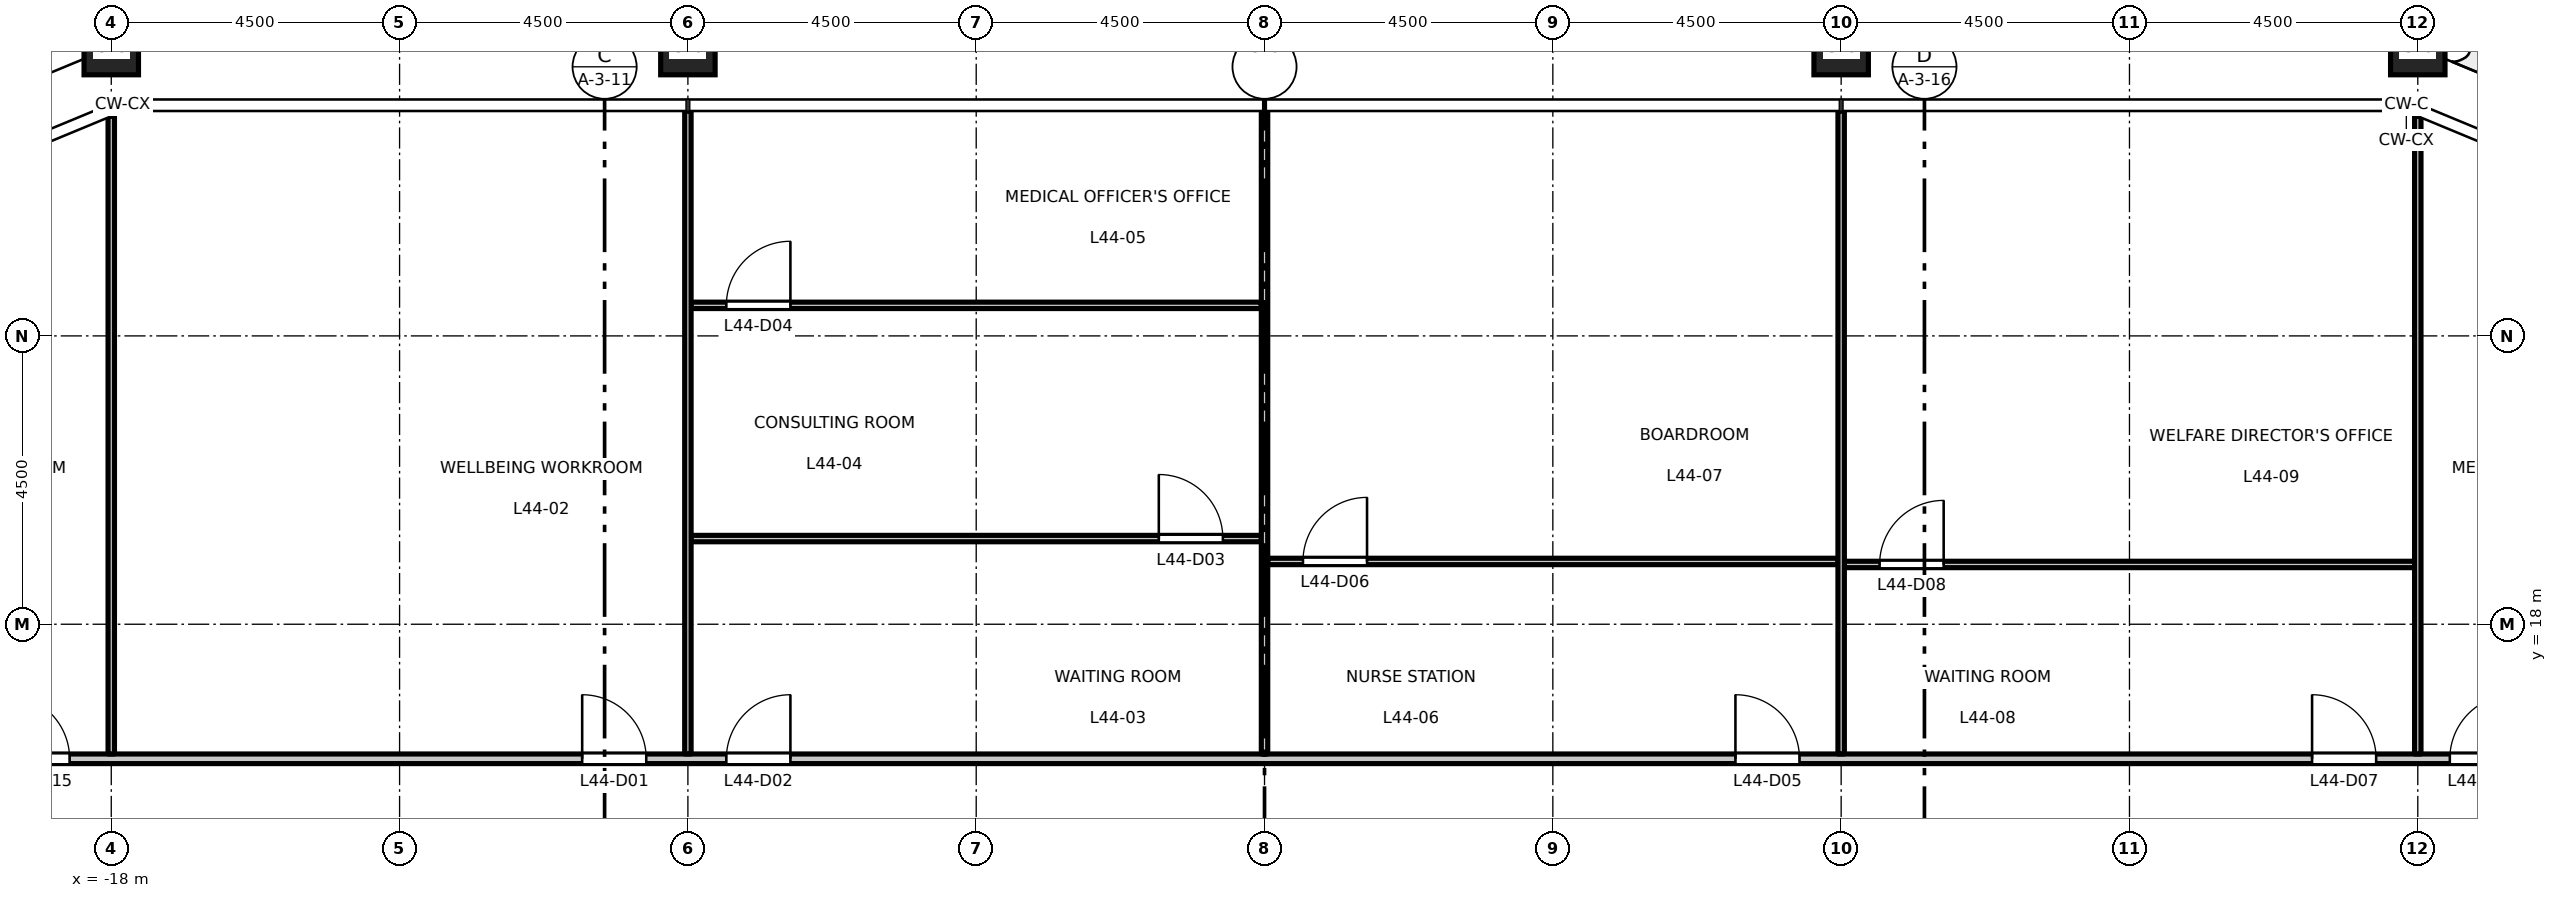
"""IFC4 building model, lengths in metres.
Left out: names, types, materials, properties, quantities, classifications, styles, units other than length and angle.
Written with IfcOpenShell. Run it as: python <this file> out.ifc"""

import sys

from ifc_helpers import new_model, si_unit, direction, frame, frame_2d, origin, origin_2d, place, context, subcontext, project, spatial, rectangle, hollow_rectangle, extrude, element, fill, save


model = new_model("IFC4")
c1 = context("Model", 3, precision=1e-05, world=origin(), true_north=direction((0.0, 1.0)))
c2 = subcontext(c1, "Body", "Model", "MODEL_VIEW")
j1 = project(units=[si_unit("LENGTHUNIT", "METRE"), si_unit("PLANEANGLEUNIT", "RADIAN")], contexts=[c1])
p1 = place(None, origin())
s1 = spatial("IfcSite", under=j1, at=p1, CompositionType="ELEMENT")
p2 = place(p1, origin())
s2 = spatial("IfcBuilding", under=s1, at=p2, CompositionType="ELEMENT")
p3 = place(p2, frame((0.0, 0.0, 206.2)))
s3 = spatial("IfcBuildingStorey", under=s2, at=p3, CompositionType="ELEMENT", Elevation=206.2)
for number, where, z_axis, x_axis in (
    (1, (18.0, 27.0, 0.0), (0.0, 0.0, 1.0), (1.0, 0.0, 0.0)),
    (2, (9.0, 27.0, 0.0), (0.0, 0.0, 1.0), (1.0, 0.0, 0.0)),
    (3, (0.0, 27.0, 0.0), (0.0, 0.0, 1.0), (1.0, 0.0, 0.0)),
    (4, (-9.0, 27.0, 0.0), (0.0, 0.0, 1.0), (1.0, 0.0, 0.0)),
    (5, (-18.0, 27.0, 0.0), (0.0, 0.0, 1.0), (1.0, 0.0, 0.0)),
):
    element("IfcColumn", number, at=place(p3, frame(where, z_axis=z_axis, x_axis=x_axis)), inside=s3, PredefinedType="COLUMN", context=c2, shape_type="SweptSolid", body=[
        extrude(hollow_rectangle(XDim=0.85, YDim=0.85, WallThickness=0.05, at=origin_2d()), origin(), (0.0, 0.0, 1.0), 4.5),
    ])
p4 = place(p3, frame((-24.225, 15.9, 0.0), z_axis=(0.0, 0.0, 1.0), x_axis=(1.0, 0.0, 0.0)))
e6 = element("IfcWall", 6, at=p4, inside=s3, PredefinedType="PARTITIONING", context=c2, shape_type="SweptSolid", body=[
    extrude(rectangle(XDim=48.45, YDim=0.15, at=frame_2d((24.225, 0.0))), origin(), (0.0, 0.0, 1.0), 4.35),
])
p5 = place(p4, frame((13.575, 0.0, 0.0)))
e7 = element("IfcOpeningElement", 7, at=p5, cuts=e6, PredefinedType="OPENING", context=c2, shape_type="SweptSolid", body=[
    extrude(rectangle(XDim=1.0, YDim=2.1, at=frame_2d((0.5, 1.05))), frame((0.0, 0.085, 0.0), z_axis=(0.0, -1.0, 0.0), x_axis=(1.0, 0.0, 0.0)), (0.0, 0.0, 1.0), 0.17),
])
p6 = place(p4, frame((15.825, 0.0, 0.0)))
e8 = element("IfcOpeningElement", 8, at=p6, cuts=e6, PredefinedType="OPENING", context=c2, shape_type="SweptSolid", body=[
    extrude(rectangle(XDim=1.0, YDim=2.1, at=frame_2d((0.5, 1.05))), frame((0.0, 0.085, 0.0), z_axis=(0.0, -1.0, 0.0), x_axis=(1.0, 0.0, 0.0)), (0.0, 0.0, 1.0), 0.17),
])
p7 = place(p4, frame((31.575, 0.0, 0.0)))
e9 = element("IfcOpeningElement", 9, at=p7, cuts=e6, PredefinedType="OPENING", context=c2, shape_type="SweptSolid", body=[
    extrude(rectangle(XDim=1.0, YDim=2.1, at=frame_2d((0.5, 1.05))), frame((0.0, 0.085, 0.0), z_axis=(0.0, -1.0, 0.0), x_axis=(1.0, 0.0, 0.0)), (0.0, 0.0, 1.0), 0.17),
])
p8 = place(p4, frame((40.575, 0.0, 0.0)))
e10 = element("IfcOpeningElement", 10, at=p8, cuts=e6, PredefinedType="OPENING", context=c2, shape_type="SweptSolid", body=[
    extrude(rectangle(XDim=1.0, YDim=2.1, at=frame_2d((0.5, 1.05))), frame((0.0, 0.085, 0.0), z_axis=(0.0, -1.0, 0.0), x_axis=(1.0, 0.0, 0.0)), (0.0, 0.0, 1.0), 0.17),
])
p9 = place(p4, frame((4.575, 0.0, 0.0)))
e11 = element("IfcOpeningElement", 11, at=p9, cuts=e6, PredefinedType="OPENING", context=c2, shape_type="SweptSolid", body=[
    extrude(rectangle(XDim=1.0, YDim=2.1, at=frame_2d((0.5, 1.05))), frame((0.0, 0.085, 0.0), z_axis=(0.0, -1.0, 0.0), x_axis=(1.0, 0.0, 0.0)), (0.0, 0.0, 1.0), 0.17),
])
p10 = place(p4, frame((42.725, 0.0, 0.0)))
e12 = element("IfcOpeningElement", 12, at=p10, cuts=e6, PredefinedType="OPENING", context=c2, shape_type="SweptSolid", body=[
    extrude(rectangle(XDim=1.0, YDim=2.1, at=frame_2d((0.5, 1.05))), frame((0.0, 0.085, 0.0), z_axis=(0.0, -1.0, 0.0), x_axis=(1.0, 0.0, 0.0)), (0.0, 0.0, 1.0), 0.17),
])
p11 = place(p3, frame((9.05, 18.933, 0.0), z_axis=(0.0, 0.0, 1.0), x_axis=(1.0, 0.0, 0.0)))
e13 = element("IfcWall", 13, at=p11, inside=s3, PredefinedType="PARTITIONING", context=c2, shape_type="SweptSolid", body=[
    extrude(rectangle(XDim=8.9, YDim=0.1, at=frame_2d((4.45, 0.0))), origin(), (0.0, 0.0, 1.0), 4.35),
])
p12 = place(p11, frame((0.55, 0.0, 0.0)))
e14 = element("IfcOpeningElement", 14, at=p12, cuts=e13, PredefinedType="OPENING", context=c2, shape_type="SweptSolid", body=[
    extrude(rectangle(XDim=1.0, YDim=2.1, at=frame_2d((0.5, 1.05))), frame((0.0, 0.06, 0.0), z_axis=(0.0, -1.0, 0.0), x_axis=(1.0, 0.0, 0.0)), (0.0, 0.0, 1.0), 0.12),
])
p13 = place(p3, frame((0.05, 18.98, 0.0), z_axis=(0.0, 0.0, 1.0), x_axis=(1.0, 0.0, 0.0)))
e15 = element("IfcWall", 15, at=p13, inside=s3, PredefinedType="PARTITIONING", context=c2, shape_type="SweptSolid", body=[
    extrude(rectangle(XDim=8.9, YDim=0.1, at=frame_2d((4.45, 0.0))), origin(), (0.0, 0.0, 1.0), 4.35),
])
p14 = place(p13, frame((0.55, 0.0, 0.0)))
e16 = element("IfcOpeningElement", 16, at=p14, cuts=e15, PredefinedType="OPENING", context=c2, shape_type="SweptSolid", body=[
    extrude(rectangle(XDim=1.0, YDim=2.1, at=frame_2d((0.5, 1.05))), frame((0.0, 0.06, 0.0), z_axis=(0.0, -1.0, 0.0), x_axis=(1.0, 0.0, 0.0)), (0.0, 0.0, 1.0), 0.12),
])
p15 = place(p3, frame((-8.95, 19.337, 0.0), z_axis=(0.0, 0.0, 1.0), x_axis=(1.0, 0.0, 0.0)))
e17 = element("IfcWall", 17, at=p15, inside=s3, PredefinedType="PARTITIONING", context=c2, shape_type="SweptSolid", body=[
    extrude(rectangle(XDim=8.9, YDim=0.1, at=frame_2d((4.45, 0.0))), origin(), (0.0, 0.0, 1.0), 4.35),
])
p16 = place(p15, frame((7.3, 0.0, 0.0)))
e18 = element("IfcOpeningElement", 18, at=p16, cuts=e17, PredefinedType="OPENING", context=c2, shape_type="SweptSolid", body=[
    extrude(rectangle(XDim=1.0, YDim=2.1, at=frame_2d((0.5, 1.05))), frame((0.0, 0.06, 0.0), z_axis=(0.0, -1.0, 0.0), x_axis=(1.0, 0.0, 0.0)), (0.0, 0.0, 1.0), 0.12),
])
p17 = place(p3, frame((-8.95, 22.977, 0.0), z_axis=(0.0, 0.0, 1.0), x_axis=(1.0, 0.0, 0.0)))
e19 = element("IfcWall", 19, at=p17, inside=s3, PredefinedType="PARTITIONING", context=c2, shape_type="SweptSolid", body=[
    extrude(rectangle(XDim=8.9, YDim=0.1, at=frame_2d((4.45, 0.0))), origin(), (0.0, 0.0, 1.0), 4.35),
])
p18 = place(p17, frame((0.55, 0.0, 0.0)))
e20 = element("IfcOpeningElement", 20, at=p18, cuts=e19, PredefinedType="OPENING", context=c2, shape_type="SweptSolid", body=[
    extrude(rectangle(XDim=1.0, YDim=2.1, at=frame_2d((0.5, 1.05))), frame((0.0, 0.06, 0.0), z_axis=(0.0, -1.0, 0.0), x_axis=(1.0, 0.0, 0.0)), (0.0, 0.0, 1.0), 0.12),
])
p19 = place(p3, frame((-18.0, 15.975, 0.0), z_axis=(0.0, 0.0, 1.0), x_axis=(0.0, 1.0, 0.0)))
e21 = element("IfcWall", 21, at=p19, inside=s3, PredefinedType="PARTITIONING", context=c2, shape_type="SweptSolid", body=[
    extrude(rectangle(XDim=9.953, YDim=0.1, at=frame_2d((4.977, 0.0))), origin(), (0.0, 0.0, 1.0), 3.65),
])
p20 = place(p3, frame((-9.0, 15.975, 0.0), z_axis=(0.0, 0.0, 1.0), x_axis=(0.0, 1.0, 0.0)))
e22 = element("IfcWall", 22, at=p20, inside=s3, PredefinedType="PARTITIONING", context=c2, shape_type="SweptSolid", body=[
    extrude(rectangle(XDim=10.035, YDim=0.1, at=frame_2d((5.018, 0.0))), origin(), (0.0, 0.0, 1.0), 3.65),
])
p21 = place(p3, frame((0.0, 15.975, 0.0), z_axis=(0.0, 0.0, 1.0), x_axis=(0.0, 1.0, 0.0)))
e23 = element("IfcWall", 23, at=p21, inside=s3, PredefinedType="PARTITIONING", context=c2, shape_type="SweptSolid", body=[
    extrude(rectangle(XDim=10.035, YDim=0.1, at=frame_2d((5.018, 0.0))), origin(), (0.0, 0.0, 1.0), 3.55),
])
p22 = place(p3, frame((9.0, 15.975, 0.0), z_axis=(0.0, 0.0, 1.0), x_axis=(0.0, 1.0, 0.0)))
e24 = element("IfcWall", 24, at=p22, inside=s3, PredefinedType="PARTITIONING", context=c2, shape_type="SweptSolid", body=[
    extrude(rectangle(XDim=10.035, YDim=0.1, at=frame_2d((5.018, 0.0))), origin(), (0.0, 0.0, 1.0), 3.65),
])
p23 = place(p3, frame((18.0, 15.975, 0.0), z_axis=(0.0, 0.0, 1.0), x_axis=(0.0, 1.0, 0.0)))
e25 = element("IfcWall", 25, at=p23, inside=s3, PredefinedType="PARTITIONING", context=c2, shape_type="SweptSolid", body=[
    extrude(rectangle(XDim=9.953, YDim=0.1, at=frame_2d((4.977, 0.0))), origin(), (0.0, 0.0, 1.0), 3.65),
])
p24 = place(p5, origin())
e26 = element("IfcDoor", 26, at=p24, inside=s3, OperationType="SINGLE_SWING_LEFT", PredefinedType="DOOR", context=c2, shape_type="SweptSolid", body=[
    extrude(rectangle(XDim=1.0, YDim=2.1, at=frame_2d((0.5, 1.05))), frame((0.0, 0.025, 0.0), z_axis=(0.0, -1.0, 0.0), x_axis=(1.0, 0.0, 0.0)), (0.0, 0.0, 1.0), 0.05),
])
fill(e7, e26)
p25 = place(p6, origin())
e27 = element("IfcDoor", 27, at=p25, inside=s3, OperationType="SINGLE_SWING_RIGHT", PredefinedType="DOOR", context=c2, shape_type="SweptSolid", body=[
    extrude(rectangle(XDim=1.0, YDim=2.1, at=frame_2d((0.5, 1.05))), frame((0.0, 0.025, 0.0), z_axis=(0.0, -1.0, 0.0), x_axis=(1.0, 0.0, 0.0)), (0.0, 0.0, 1.0), 0.05),
])
fill(e8, e27)
p26 = place(p16, origin())
e28 = element("IfcDoor", 28, at=p26, inside=s3, OperationType="SINGLE_SWING_LEFT", PredefinedType="DOOR", context=c2, shape_type="SweptSolid", body=[
    extrude(rectangle(XDim=1.0, YDim=2.1, at=frame_2d((0.5, 1.05))), frame((0.0, 0.025, 0.0), z_axis=(0.0, -1.0, 0.0), x_axis=(1.0, 0.0, 0.0)), (0.0, 0.0, 1.0), 0.05),
])
fill(e18, e28)
p27 = place(p18, origin())
e29 = element("IfcDoor", 29, at=p27, inside=s3, OperationType="SINGLE_SWING_RIGHT", PredefinedType="DOOR", context=c2, shape_type="SweptSolid", body=[
    extrude(rectangle(XDim=1.0, YDim=2.1, at=frame_2d((0.5, 1.05))), frame((0.0, 0.025, 0.0), z_axis=(0.0, -1.0, 0.0), x_axis=(1.0, 0.0, 0.0)), (0.0, 0.0, 1.0), 0.05),
])
fill(e20, e29)
p28 = place(p7, origin())
e30 = element("IfcDoor", 30, at=p28, inside=s3, OperationType="SINGLE_SWING_LEFT", PredefinedType="DOOR", context=c2, shape_type="SweptSolid", body=[
    extrude(rectangle(XDim=1.0, YDim=2.1, at=frame_2d((0.5, 1.05))), frame((0.0, 0.025, 0.0), z_axis=(0.0, -1.0, 0.0), x_axis=(1.0, 0.0, 0.0)), (0.0, 0.0, 1.0), 0.05),
])
fill(e9, e30)
p29 = place(p14, origin())
e31 = element("IfcDoor", 31, at=p29, inside=s3, OperationType="SINGLE_SWING_RIGHT", PredefinedType="DOOR", context=c2, shape_type="SweptSolid", body=[
    extrude(rectangle(XDim=1.0, YDim=2.1, at=frame_2d((0.5, 1.05))), frame((0.0, 0.025, 0.0), z_axis=(0.0, -1.0, 0.0), x_axis=(1.0, 0.0, 0.0)), (0.0, 0.0, 1.0), 0.05),
])
fill(e16, e31)
p30 = place(p8, origin())
e32 = element("IfcDoor", 32, at=p30, inside=s3, OperationType="SINGLE_SWING_LEFT", PredefinedType="DOOR", context=c2, shape_type="SweptSolid", body=[
    extrude(rectangle(XDim=1.0, YDim=2.1, at=frame_2d((0.5, 1.05))), frame((0.0, 0.025, 0.0), z_axis=(0.0, -1.0, 0.0), x_axis=(1.0, 0.0, 0.0)), (0.0, 0.0, 1.0), 0.05),
])
fill(e10, e32)
p31 = place(p12, origin())
e33 = element("IfcDoor", 33, at=p31, inside=s3, OperationType="SINGLE_SWING_RIGHT", PredefinedType="DOOR", context=c2, shape_type="SweptSolid", body=[
    extrude(rectangle(XDim=1.0, YDim=2.1, at=frame_2d((0.5, 1.05))), frame((0.0, 0.025, 0.0), z_axis=(0.0, -1.0, 0.0), x_axis=(1.0, 0.0, 0.0)), (0.0, 0.0, 1.0), 0.05),
])
fill(e14, e33)
p32 = place(p9, origin())
e34 = element("IfcDoor", 34, at=p32, inside=s3, OperationType="SINGLE_SWING_LEFT", PredefinedType="DOOR", context=c2, shape_type="SweptSolid", body=[
    extrude(rectangle(XDim=1.0, YDim=2.1, at=frame_2d((0.5, 1.05))), frame((0.0, 0.025, 0.0), z_axis=(0.0, -1.0, 0.0), x_axis=(1.0, 0.0, 0.0)), (0.0, 0.0, 1.0), 0.05),
])
fill(e11, e34)
p33 = place(p10, origin())
e35 = element("IfcDoor", 35, at=p33, inside=s3, OperationType="SINGLE_SWING_RIGHT", PredefinedType="DOOR", context=c2, shape_type="SweptSolid", body=[
    extrude(rectangle(XDim=1.0, YDim=2.1, at=frame_2d((0.5, 1.05))), frame((0.0, 0.025, 0.0), z_axis=(0.0, -1.0, 0.0), x_axis=(1.0, 0.0, 0.0)), (0.0, 0.0, 1.0), 0.05),
])
fill(e12, e35)
save(model, sys.argv[1])
